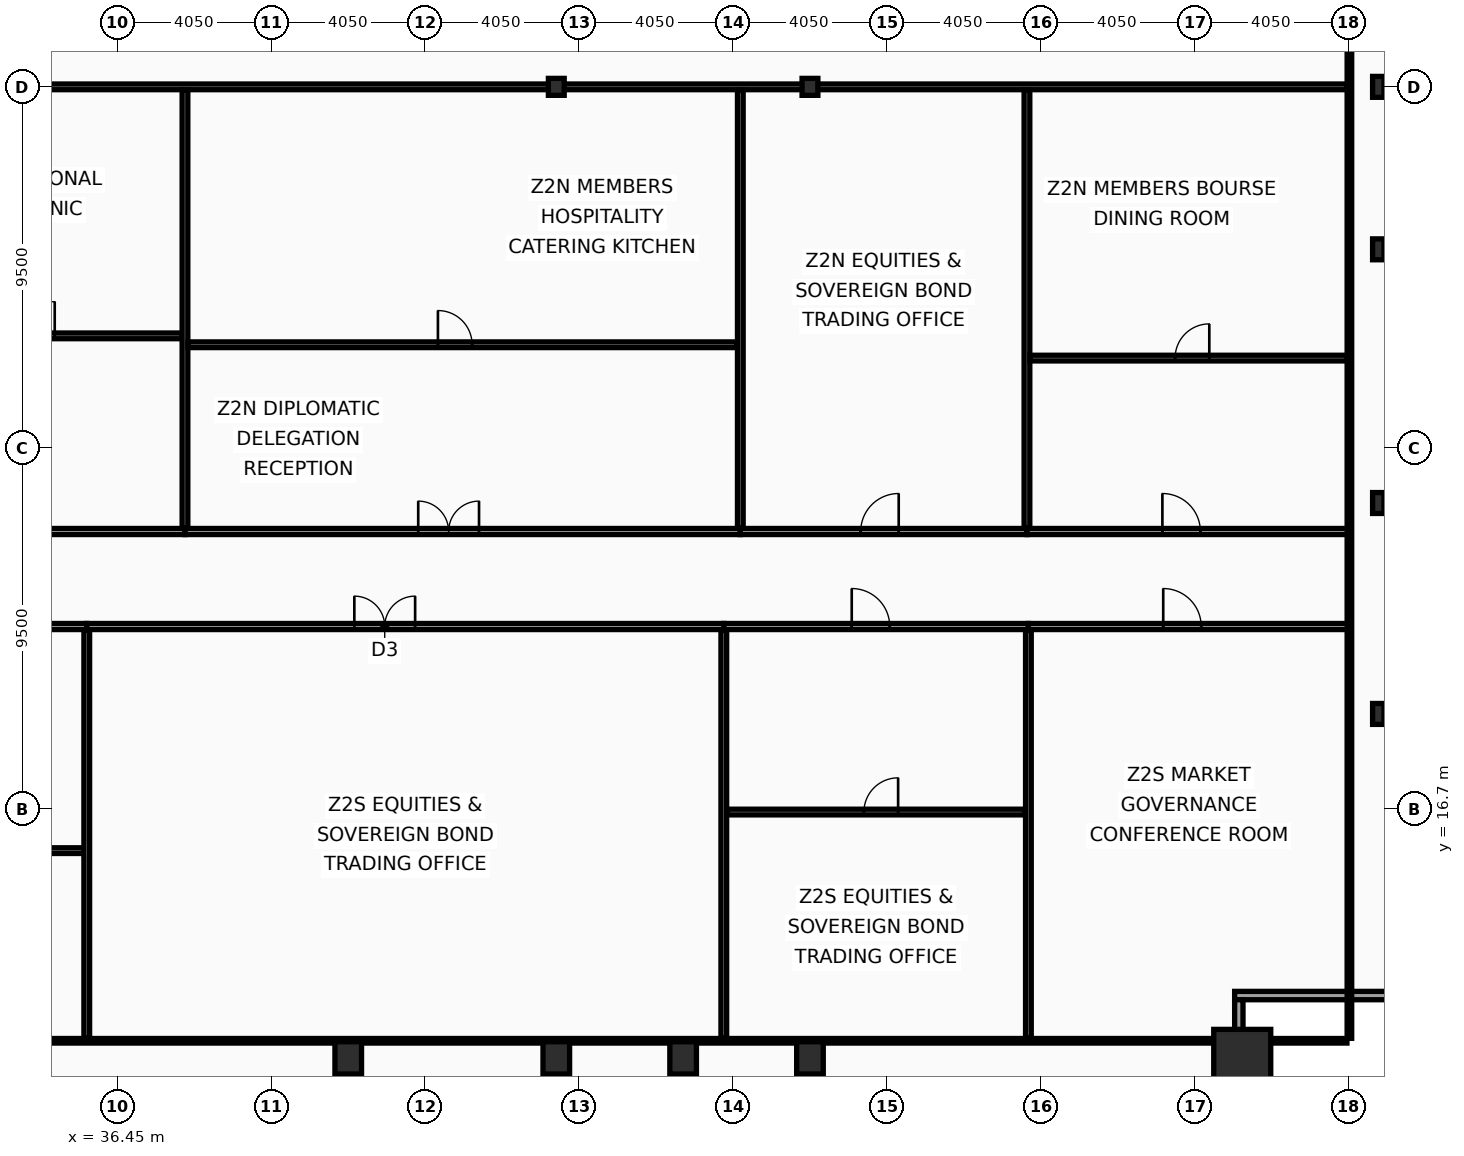
"""IFC4 building model, lengths in metres.
Left out: names, types, materials, properties, quantities, classifications, styles, units other than length and angle.
Written with IfcOpenShell. Run it as: python <this file> out.ifc"""

import sys

from ifc_helpers import new_model, si_unit, direction, frame, frame_2d, origin, origin_2d, place, context, subcontext, project, spatial, rectangle, hollow_rectangle, i_section, extrude, element, fill, save


model = new_model("IFC4")
c1 = context("Model", 3, precision=1e-05, world=origin(), true_north=direction((0.0, 1.0)))
c2 = subcontext(c1, "Body", "Model", "MODEL_VIEW")
j1 = project(units=[si_unit("LENGTHUNIT", "METRE"), si_unit("PLANEANGLEUNIT", "RADIAN")], contexts=[c1])
p1 = place(None, origin())
s1 = spatial("IfcSite", under=j1, at=p1, CompositionType="ELEMENT")
p2 = place(p1, origin())
s2 = spatial("IfcBuilding", under=s1, at=p2, CompositionType="ELEMENT")
p3 = place(p2, frame((0.0, 0.0, 129.0)))
s3 = spatial("IfcBuildingStorey", under=s2, at=p3, CompositionType="ELEMENT", Elevation=129.0)
p4 = place(p3, frame((66.05, 10.15, 0.0), z_axis=(0.0, 0.0, 1.0), x_axis=(1.0, 0.0, 0.0)))
e1 = element("IfcColumn", 1, at=p4, inside=s3, PredefinedType="COLUMN", context=c2, shape_type="SweptSolid", body=[
    extrude(hollow_rectangle(XDim=1.5, YDim=1.5, WallThickness=0.07, at=origin_2d()), origin(), (0.0, 0.0, 1.0), 3.6),
])
for number, where, z_axis, x_axis in (
    (2, (42.525, 10.15, 0.0), (0.0, 0.0, 1.0), (1.0, 0.0, 0.0)),
    (3, (48.0, 10.15, 0.0), (0.0, 0.0, 1.0), (1.0, 0.0, 0.0)),
    (4, (51.337, 10.15, 0.0), (0.0, 0.0, 1.0), (1.0, 0.0, 0.0)),
    (5, (54.675, 10.15, 0.0), (0.0, 0.0, 1.0), (1.0, 0.0, 0.0)),
):
    element("IfcColumn", number, at=place(p3, frame(where, z_axis=z_axis, x_axis=x_axis)), inside=s3, PredefinedType="COLUMN", context=c2, shape_type="SweptSolid", body=[
        extrude(hollow_rectangle(XDim=0.7, YDim=0.85, WallThickness=0.05, at=origin_2d()), origin(), (0.0, 0.0, 1.0), 3.6),
    ])
for number, where, z_axis, x_axis in (
    (6, (69.63, 19.2, 0.0), (0.0, 0.0, 1.0), (1.0, 0.0, 0.0)),
    (7, (69.63, 24.75, 0.0), (0.0, 0.0, 1.0), (1.0, 0.0, 0.0)),
    (8, (69.63, 31.425, 0.0), (0.0, 0.0, 1.0), (1.0, 0.0, 0.0)),
    (9, (69.63, 35.7, 0.0), (0.0, 0.0, 1.0), (1.0, 0.0, 0.0)),
):
    element("IfcColumn", number, at=place(p3, frame(where, z_axis=z_axis, x_axis=x_axis)), inside=s3, PredefinedType="COLUMN", context=c2, shape_type="SweptSolid", body=[
        extrude(i_section(OverallWidth=0.3, OverallDepth=0.55, WebThickness=0.015, FlangeThickness=0.029, at=origin_2d()), origin(), (0.0, 0.0, 1.0), 3.6),
    ])
for number, where, z_axis, x_axis in (
    (10, (48.0, 35.7, 0.0), (0.0, 0.0, 1.0), (1.0, 0.0, 0.0)),
    (11, (54.675, 35.7, 0.0), (0.0, 0.0, 1.0), (1.0, 0.0, 0.0)),
):
    element("IfcColumn", number, at=place(p3, frame(where, z_axis=z_axis, x_axis=x_axis)), inside=s3, PredefinedType="COLUMN", context=c2, shape_type="SweptSolid", body=[
        extrude(i_section(OverallWidth=0.416, OverallDepth=0.446, WebThickness=0.039, FlangeThickness=0.063, at=origin_2d()), origin(), (0.0, 0.0, 1.0), 3.6),
    ])
p5 = place(p3, frame((70.07, 11.79, 0.0), z_axis=(0.0, 0.0, 1.0), x_axis=(-1.0, 0.0, 0.0)))
e12 = element("IfcWall", 12, at=p5, inside=s3, PredefinedType="SOLIDWALL", context=c2, shape_type="SweptSolid", body=[
    extrude(rectangle(XDim=4.22, YDim=0.22, at=frame_2d((2.11, 0.0))), origin(), (0.0, 0.0, 1.0), 2.83),
])
p6 = place(p3, frame((65.96, 11.68, 0.0), z_axis=(0.0, 0.0, 1.0), x_axis=(0.0, -1.0, 0.0)))
e13 = element("IfcWall", 13, at=p6, inside=s3, PredefinedType="SOLIDWALL", context=c2, shape_type="SweptSolid", body=[
    extrude(rectangle(XDim=3.91, YDim=0.22, at=frame_2d((1.955, 0.0))), origin(), (0.0, 0.0, 1.0), 2.83),
])
p7 = place(p3, frame((23.701, 21.5, 0.0), z_axis=(0.0, 0.0, 1.0), x_axis=(1.0, 0.0, 0.0)))
e14 = element("IfcWall", 14, at=p7, inside=s3, PredefinedType="PARTITIONING", context=c2, shape_type="SweptSolid", body=[
    extrude(rectangle(XDim=11.944, YDim=0.16, at=frame_2d((5.972, 0.0))), origin(), (0.0, 0.0, 1.0), 2.73),
])
p8 = place(p7, frame((5.016, 0.0, 0.0)))
e15 = element("IfcOpeningElement", 15, at=p8, cuts=e14, PredefinedType="OPENING", context=c2, shape_type="SweptSolid", body=[
    extrude(rectangle(XDim=1.0, YDim=2.05, at=frame_2d((0.5, 1.025))), frame((0.0, 0.09, 0.0), z_axis=(0.0, -1.0, 0.0), x_axis=(1.0, 0.0, 0.0)), (0.0, 0.0, 1.0), 0.18),
])
p9 = place(p3, frame((23.781, 15.603, 0.0), z_axis=(0.0, 0.0, 1.0), x_axis=(1.0, 0.0, 0.0)))
e16 = element("IfcWall", 16, at=p9, inside=s3, PredefinedType="PARTITIONING", context=c2, shape_type="SweptSolid", body=[
    extrude(rectangle(XDim=11.784, YDim=0.15, at=frame_2d((5.892, 0.0))), origin(), (0.0, 0.0, 1.0), 2.73),
])
p10 = place(p9, frame((5.375, 0.0, 0.0)))
e17 = element("IfcOpeningElement", 17, at=p10, cuts=e16, PredefinedType="OPENING", context=c2, shape_type="SweptSolid", body=[
    extrude(rectangle(XDim=0.9, YDim=2.05, at=frame_2d((0.45, 1.025))), frame((0.0, 0.085, 0.0), z_axis=(0.0, -1.0, 0.0), x_axis=(1.0, 0.0, 0.0)), (0.0, 0.0, 1.0), 0.17),
])
p11 = place(p3, frame((35.645, 21.5, 0.0), z_axis=(0.0, 0.0, 1.0), x_axis=(1.0, 0.0, 0.0)))
e18 = element("IfcWall", 18, at=p11, inside=s3, PredefinedType="PARTITIONING", context=c2, shape_type="SweptSolid", body=[
    extrude(rectangle(XDim=16.763, YDim=0.16, at=frame_2d((8.382, 0.0))), origin(), (0.0, 0.0, 1.0), 2.73),
])
p12 = place(p11, frame((7.041, 0.0, 0.0)))
e19 = element("IfcOpeningElement", 19, at=p12, cuts=e18, PredefinedType="OPENING", context=c2, shape_type="SweptSolid", body=[
    extrude(rectangle(XDim=1.6, YDim=2.15, at=frame_2d((0.8, 1.075))), frame((0.0, 0.09, 0.0), z_axis=(0.0, -1.0, 0.0), x_axis=(1.0, 0.0, 0.0)), (0.0, 0.0, 1.0), 0.18),
])
p13 = place(p3, frame((35.645, 10.665, 0.0), z_axis=(0.0, 0.0, 1.0), x_axis=(0.0, 1.0, 0.0)))
e20 = element("IfcWall", 20, at=p13, inside=s3, PredefinedType="PARTITIONING", context=c2, shape_type="SweptSolid", body=[
    extrude(rectangle(XDim=10.75, YDim=0.15, at=frame_2d((5.375, 0.0))), origin(), (0.0, 0.0, 1.0), 2.88),
])
p14 = place(p3, frame((52.408, 21.5, 0.0), z_axis=(0.0, 0.0, 1.0), x_axis=(1.0, 0.0, 0.0)))
e21 = element("IfcWall", 21, at=p14, inside=s3, PredefinedType="PARTITIONING", context=c2, shape_type="SweptSolid", body=[
    extrude(rectangle(XDim=8.015, YDim=0.16, at=frame_2d((4.007, 0.0))), origin(), (0.0, 0.0, 1.0), 2.73),
])
p15 = place(p14, frame((3.366, 0.0, 0.0)))
e22 = element("IfcOpeningElement", 22, at=p15, cuts=e21, PredefinedType="OPENING", context=c2, shape_type="SweptSolid", body=[
    extrude(rectangle(XDim=1.0, YDim=2.05, at=frame_2d((0.5, 1.025))), frame((0.0, 0.09, 0.0), z_axis=(0.0, -1.0, 0.0), x_axis=(1.0, 0.0, 0.0)), (0.0, 0.0, 1.0), 0.18),
])
p16 = place(p3, frame((52.408, 10.665, 0.0), z_axis=(0.0, 0.0, 1.0), x_axis=(0.0, 1.0, 0.0)))
e23 = element("IfcWall", 23, at=p16, inside=s3, PredefinedType="PARTITIONING", context=c2, shape_type="SweptSolid", body=[
    extrude(rectangle(XDim=10.75, YDim=0.15, at=frame_2d((5.375, 0.0))), origin(), (0.0, 0.0, 1.0), 2.88),
])
p17 = place(p3, frame((52.488, 16.619, 0.0), z_axis=(0.0, 0.0, 1.0), x_axis=(1.0, 0.0, 0.0)))
e24 = element("IfcWall", 24, at=p17, inside=s3, PredefinedType="PARTITIONING", context=c2, shape_type="SweptSolid", body=[
    extrude(rectangle(XDim=7.855, YDim=0.15, at=frame_2d((3.928, 0.0))), origin(), (0.0, 0.0, 1.0), 2.73),
])
p18 = place(p17, frame((3.607, 0.0, 0.0)))
e25 = element("IfcOpeningElement", 25, at=p18, cuts=e24, PredefinedType="OPENING", context=c2, shape_type="SweptSolid", body=[
    extrude(rectangle(XDim=0.9, YDim=2.05, at=frame_2d((0.45, 1.025))), frame((0.0, 0.085, 0.0), z_axis=(0.0, -1.0, 0.0), x_axis=(1.0, 0.0, 0.0)), (0.0, 0.0, 1.0), 0.17),
])
p19 = place(p3, frame((60.423, 21.5, 0.0), z_axis=(0.0, 0.0, 1.0), x_axis=(1.0, 0.0, 0.0)))
e26 = element("IfcWall", 26, at=p19, inside=s3, PredefinedType="PARTITIONING", context=c2, shape_type="SweptSolid", body=[
    extrude(rectangle(XDim=8.447, YDim=0.16, at=frame_2d((4.224, 0.0))), origin(), (0.0, 0.0, 1.0), 3.44),
])
p20 = place(p19, frame((3.548, 0.0, 0.0)))
e27 = element("IfcOpeningElement", 27, at=p20, cuts=e26, PredefinedType="OPENING", context=c2, shape_type="SweptSolid", body=[
    extrude(rectangle(XDim=1.0, YDim=2.05, at=frame_2d((0.5, 1.025))), frame((0.0, 0.09, 0.0), z_axis=(0.0, -1.0, 0.0), x_axis=(1.0, 0.0, 0.0)), (0.0, 0.0, 1.0), 0.18),
])
p21 = place(p3, frame((60.423, 10.665, 0.0), z_axis=(0.0, 0.0, 1.0), x_axis=(0.0, 1.0, 0.0)))
e28 = element("IfcWall", 28, at=p21, inside=s3, PredefinedType="PARTITIONING", context=c2, shape_type="SweptSolid", body=[
    extrude(rectangle(XDim=10.75, YDim=0.15, at=frame_2d((5.375, 0.0))), origin(), (0.0, 0.0, 1.0), 2.73),
])
p22 = place(p3, frame((21.81, 35.7, 0.0), z_axis=(0.0, 0.0, 1.0), x_axis=(1.0, 0.0, 0.0)))
e29 = element("IfcWall", 29, at=p22, inside=s3, PredefinedType="PARTITIONING", context=c2, shape_type="SweptSolid", body=[
    extrude(rectangle(XDim=46.995, YDim=0.15, at=frame_2d((23.498, 0.0))), origin(), (0.0, 0.0, 1.0), 2.73),
])
p23 = place(p3, frame((30.215, 24.0, 0.0), z_axis=(0.0, 0.0, 1.0), x_axis=(1.0, 0.0, 0.0)))
e30 = element("IfcWall", 30, at=p23, inside=s3, PredefinedType="PARTITIONING", context=c2, shape_type="SweptSolid", body=[
    extrude(rectangle(XDim=8.014, YDim=0.16, at=frame_2d((4.007, 0.0))), origin(), (0.0, 0.0, 1.0), 2.73),
])
p24 = place(p23, frame((3.366, 0.0, 0.0)))
e31 = element("IfcOpeningElement", 31, at=p24, cuts=e30, PredefinedType="OPENING", context=c2, shape_type="SweptSolid", body=[
    extrude(rectangle(XDim=1.0, YDim=2.05, at=frame_2d((0.5, 1.025))), frame((0.0, 0.09, 0.0), z_axis=(0.0, -1.0, 0.0), x_axis=(1.0, 0.0, 0.0)), (0.0, 0.0, 1.0), 0.18),
])
p25 = place(p3, frame((30.295, 29.148, 0.0), z_axis=(0.0, 0.0, 1.0), x_axis=(1.0, 0.0, 0.0)))
e32 = element("IfcWall", 32, at=p25, inside=s3, PredefinedType="PARTITIONING", context=c2, shape_type="SweptSolid", body=[
    extrude(rectangle(XDim=7.854, YDim=0.15, at=frame_2d((3.927, 0.0))), origin(), (0.0, 0.0, 1.0), 2.73),
])
p26 = place(p25, frame((3.606, 0.0, 0.0)))
e33 = element("IfcOpeningElement", 33, at=p26, cuts=e32, PredefinedType="OPENING", context=c2, shape_type="SweptSolid", body=[
    extrude(rectangle(XDim=0.9, YDim=2.05, at=frame_2d((0.45, 1.025))), frame((0.0, 0.085, 0.0), z_axis=(0.0, -1.0, 0.0), x_axis=(1.0, 0.0, 0.0)), (0.0, 0.0, 1.0), 0.17),
])
p27 = place(p3, frame((38.229, 24.0, 0.0), z_axis=(0.0, 0.0, 1.0), x_axis=(1.0, 0.0, 0.0)))
e34 = element("IfcWall", 34, at=p27, inside=s3, PredefinedType="PARTITIONING", context=c2, shape_type="SweptSolid", body=[
    extrude(rectangle(XDim=14.613, YDim=0.16, at=frame_2d((7.307, 0.0))), origin(), (0.0, 0.0, 1.0), 2.73),
])
p28 = place(p27, frame((6.138, 0.0, 0.0)))
e35 = element("IfcOpeningElement", 35, at=p28, cuts=e34, PredefinedType="OPENING", context=c2, shape_type="SweptSolid", body=[
    extrude(rectangle(XDim=1.6, YDim=2.15, at=frame_2d((0.8, 1.075))), frame((0.0, 0.09, 0.0), z_axis=(0.0, -1.0, 0.0), x_axis=(1.0, 0.0, 0.0)), (0.0, 0.0, 1.0), 0.18),
])
p29 = place(p3, frame((38.229, 24.085, 0.0), z_axis=(0.0, 0.0, 1.0), x_axis=(0.0, 1.0, 0.0)))
e36 = element("IfcWall", 36, at=p29, inside=s3, PredefinedType="PARTITIONING", context=c2, shape_type="SweptSolid", body=[
    extrude(rectangle(XDim=11.535, YDim=0.15, at=frame_2d((5.768, 0.0))), origin(), (0.0, 0.0, 1.0), 2.88),
])
p30 = place(p3, frame((38.309, 28.914, 0.0), z_axis=(0.0, 0.0, 1.0), x_axis=(1.0, 0.0, 0.0)))
e37 = element("IfcWall", 37, at=p30, inside=s3, PredefinedType="PARTITIONING", context=c2, shape_type="SweptSolid", body=[
    extrude(rectangle(XDim=14.453, YDim=0.15, at=frame_2d((7.227, 0.0))), origin(), (0.0, 0.0, 1.0), 2.73),
])
p31 = place(p30, frame((6.576, 0.0, 0.0)))
e38 = element("IfcOpeningElement", 38, at=p31, cuts=e37, PredefinedType="OPENING", context=c2, shape_type="SweptSolid", body=[
    extrude(rectangle(XDim=0.9, YDim=2.05, at=frame_2d((0.45, 1.025))), frame((0.0, 0.085, 0.0), z_axis=(0.0, -1.0, 0.0), x_axis=(1.0, 0.0, 0.0)), (0.0, 0.0, 1.0), 0.17),
])
p32 = place(p3, frame((52.842, 24.0, 0.0), z_axis=(0.0, 0.0, 1.0), x_axis=(1.0, 0.0, 0.0)))
e39 = element("IfcWall", 39, at=p32, inside=s3, PredefinedType="PARTITIONING", context=c2, shape_type="SweptSolid", body=[
    extrude(rectangle(XDim=7.542, YDim=0.16, at=frame_2d((3.771, 0.0))), origin(), (0.0, 0.0, 1.0), 2.73),
])
p33 = place(p32, frame((3.168, 0.0, 0.0)))
e40 = element("IfcOpeningElement", 40, at=p33, cuts=e39, PredefinedType="OPENING", context=c2, shape_type="SweptSolid", body=[
    extrude(rectangle(XDim=1.0, YDim=2.05, at=frame_2d((0.5, 1.025))), frame((0.0, 0.09, 0.0), z_axis=(0.0, -1.0, 0.0), x_axis=(1.0, 0.0, 0.0)), (0.0, 0.0, 1.0), 0.18),
])
p34 = place(p3, frame((52.842, 24.085, 0.0), z_axis=(0.0, 0.0, 1.0), x_axis=(0.0, 1.0, 0.0)))
e41 = element("IfcWall", 41, at=p34, inside=s3, PredefinedType="PARTITIONING", context=c2, shape_type="SweptSolid", body=[
    extrude(rectangle(XDim=11.535, YDim=0.15, at=frame_2d((5.768, 0.0))), origin(), (0.0, 0.0, 1.0), 2.88),
])
p35 = place(p3, frame((60.385, 24.0, 0.0), z_axis=(0.0, 0.0, 1.0), x_axis=(1.0, 0.0, 0.0)))
e42 = element("IfcWall", 42, at=p35, inside=s3, PredefinedType="PARTITIONING", context=c2, shape_type="SweptSolid", body=[
    extrude(rectangle(XDim=8.485, YDim=0.16, at=frame_2d((4.243, 0.0))), origin(), (0.0, 0.0, 1.0), 3.44),
])
p36 = place(p35, frame((3.564, 0.0, 0.0)))
e43 = element("IfcOpeningElement", 43, at=p36, cuts=e42, PredefinedType="OPENING", context=c2, shape_type="SweptSolid", body=[
    extrude(rectangle(XDim=1.0, YDim=2.05, at=frame_2d((0.5, 1.025))), frame((0.0, 0.09, 0.0), z_axis=(0.0, -1.0, 0.0), x_axis=(1.0, 0.0, 0.0)), (0.0, 0.0, 1.0), 0.18),
])
p37 = place(p3, frame((60.385, 24.085, 0.0), z_axis=(0.0, 0.0, 1.0), x_axis=(0.0, 1.0, 0.0)))
e44 = element("IfcWall", 44, at=p37, inside=s3, PredefinedType="PARTITIONING", context=c2, shape_type="SweptSolid", body=[
    extrude(rectangle(XDim=11.535, YDim=0.15, at=frame_2d((5.768, 0.0))), origin(), (0.0, 0.0, 1.0), 2.73),
])
p38 = place(p3, frame((60.465, 28.563, 0.0), z_axis=(0.0, 0.0, 1.0), x_axis=(1.0, 0.0, 0.0)))
e45 = element("IfcWall", 45, at=p38, inside=s3, PredefinedType="PARTITIONING", context=c2, shape_type="SweptSolid", body=[
    extrude(rectangle(XDim=8.34, YDim=0.15, at=frame_2d((4.17, 0.0))), origin(), (0.0, 0.0, 1.0), 3.44),
])
p39 = place(p38, frame((3.818, 0.0, 0.0)))
e46 = element("IfcOpeningElement", 46, at=p39, cuts=e45, PredefinedType="OPENING", context=c2, shape_type="SweptSolid", body=[
    extrude(rectangle(XDim=0.9, YDim=2.05, at=frame_2d((0.45, 1.025))), frame((0.0, 0.085, 0.0), z_axis=(0.0, -1.0, 0.0), x_axis=(1.0, 0.0, 0.0)), (0.0, 0.0, 1.0), 0.17),
])
p40 = place(p3, frame((68.87, 10.665, 0.0), z_axis=(0.0, 0.0, 1.0), x_axis=(0.0, 1.0, 0.0)))
e47 = element("IfcWall", 47, at=p40, inside=s3, PredefinedType="PARTITIONING", context=c2, shape_type="SweptSolid", body=[
    extrude(rectangle(XDim=42.11, YDim=0.12, at=frame_2d((21.055, 0.0))), origin(), (0.0, 0.0, 1.0), 2.73),
])
p41 = place(p3, frame((4.095, 10.6, 0.0), z_axis=(0.0, 0.0, 1.0), x_axis=(1.0, 0.0, 0.0)))
e48 = element("IfcWall", 48, at=p41, inside=s3, PredefinedType="PARTITIONING", context=c2, shape_type="SweptSolid", body=[
    extrude(rectangle(XDim=64.71, YDim=0.12, at=frame_2d((32.355, 0.0))), origin(), (0.0, 0.0, 1.0), 2.73),
])
p42 = place(p12, origin())
e49 = element("IfcDoor", 49, at=p42, inside=s3, OperationType="DOUBLE_DOOR_SINGLE_SWING", PredefinedType="DOOR", context=c2, shape_type="SweptSolid", body=[
    extrude(rectangle(XDim=1.6, YDim=2.15, at=frame_2d((0.8, 1.075))), frame((0.0, 0.025, 0.0), z_axis=(0.0, -1.0, 0.0), x_axis=(1.0, 0.0, 0.0)), (0.0, 0.0, 1.0), 0.05),
])
fill(e19, e49)
p43 = place(p15, origin())
e50 = element("IfcDoor", 50, at=p43, inside=s3, OperationType="SINGLE_SWING_LEFT", PredefinedType="DOOR", context=c2, shape_type="SweptSolid", body=[
    extrude(rectangle(XDim=1.0, YDim=2.05, at=frame_2d((0.5, 1.025))), frame((0.0, 0.025, 0.0), z_axis=(0.0, -1.0, 0.0), x_axis=(1.0, 0.0, 0.0)), (0.0, 0.0, 1.0), 0.05),
])
fill(e22, e50)
p44 = place(p18, origin())
e51 = element("IfcDoor", 51, at=p44, inside=s3, OperationType="SINGLE_SWING_RIGHT", PredefinedType="DOOR", context=c2, shape_type="SweptSolid", body=[
    extrude(rectangle(XDim=0.9, YDim=2.05, at=frame_2d((0.45, 1.025))), frame((0.0, 0.025, 0.0), z_axis=(0.0, -1.0, 0.0), x_axis=(1.0, 0.0, 0.0)), (0.0, 0.0, 1.0), 0.05),
])
fill(e25, e51)
p45 = place(p20, origin())
e52 = element("IfcDoor", 52, at=p45, inside=s3, OperationType="SINGLE_SWING_LEFT", PredefinedType="DOOR", context=c2, shape_type="SweptSolid", body=[
    extrude(rectangle(XDim=1.0, YDim=2.05, at=frame_2d((0.5, 1.025))), frame((0.0, 0.025, 0.0), z_axis=(0.0, -1.0, 0.0), x_axis=(1.0, 0.0, 0.0)), (0.0, 0.0, 1.0), 0.05),
])
fill(e27, e52)
p46 = place(p26, origin())
e53 = element("IfcDoor", 53, at=p46, inside=s3, OperationType="SINGLE_SWING_RIGHT", PredefinedType="DOOR", context=c2, shape_type="SweptSolid", body=[
    extrude(rectangle(XDim=0.9, YDim=2.05, at=frame_2d((0.45, 1.025))), frame((0.0, 0.025, 0.0), z_axis=(0.0, -1.0, 0.0), x_axis=(1.0, 0.0, 0.0)), (0.0, 0.0, 1.0), 0.05),
])
fill(e33, e53)
p47 = place(p28, origin())
e54 = element("IfcDoor", 54, at=p47, inside=s3, OperationType="DOUBLE_DOOR_SINGLE_SWING", PredefinedType="DOOR", context=c2, shape_type="SweptSolid", body=[
    extrude(rectangle(XDim=1.6, YDim=2.15, at=frame_2d((0.8, 1.075))), frame((0.0, 0.025, 0.0), z_axis=(0.0, -1.0, 0.0), x_axis=(1.0, 0.0, 0.0)), (0.0, 0.0, 1.0), 0.05),
])
fill(e35, e54)
p48 = place(p31, origin())
e55 = element("IfcDoor", 55, at=p48, inside=s3, OperationType="SINGLE_SWING_LEFT", PredefinedType="DOOR", context=c2, shape_type="SweptSolid", body=[
    extrude(rectangle(XDim=0.9, YDim=2.05, at=frame_2d((0.45, 1.025))), frame((0.0, 0.025, 0.0), z_axis=(0.0, -1.0, 0.0), x_axis=(1.0, 0.0, 0.0)), (0.0, 0.0, 1.0), 0.05),
])
fill(e38, e55)
p49 = place(p33, origin())
e56 = element("IfcDoor", 56, at=p49, inside=s3, OperationType="SINGLE_SWING_RIGHT", PredefinedType="DOOR", context=c2, shape_type="SweptSolid", body=[
    extrude(rectangle(XDim=1.0, YDim=2.05, at=frame_2d((0.5, 1.025))), frame((0.0, 0.025, 0.0), z_axis=(0.0, -1.0, 0.0), x_axis=(1.0, 0.0, 0.0)), (0.0, 0.0, 1.0), 0.05),
])
fill(e40, e56)
p50 = place(p36, origin())
e57 = element("IfcDoor", 57, at=p50, inside=s3, OperationType="SINGLE_SWING_LEFT", PredefinedType="DOOR", context=c2, shape_type="SweptSolid", body=[
    extrude(rectangle(XDim=1.0, YDim=2.05, at=frame_2d((0.5, 1.025))), frame((0.0, 0.025, 0.0), z_axis=(0.0, -1.0, 0.0), x_axis=(1.0, 0.0, 0.0)), (0.0, 0.0, 1.0), 0.05),
])
fill(e43, e57)
p51 = place(p39, origin())
e58 = element("IfcDoor", 58, at=p51, inside=s3, OperationType="SINGLE_SWING_RIGHT", PredefinedType="DOOR", context=c2, shape_type="SweptSolid", body=[
    extrude(rectangle(XDim=0.9, YDim=2.05, at=frame_2d((0.45, 1.025))), frame((0.0, 0.025, 0.0), z_axis=(0.0, -1.0, 0.0), x_axis=(1.0, 0.0, 0.0)), (0.0, 0.0, 1.0), 0.05),
])
fill(e46, e58)
save(model, sys.argv[1])
